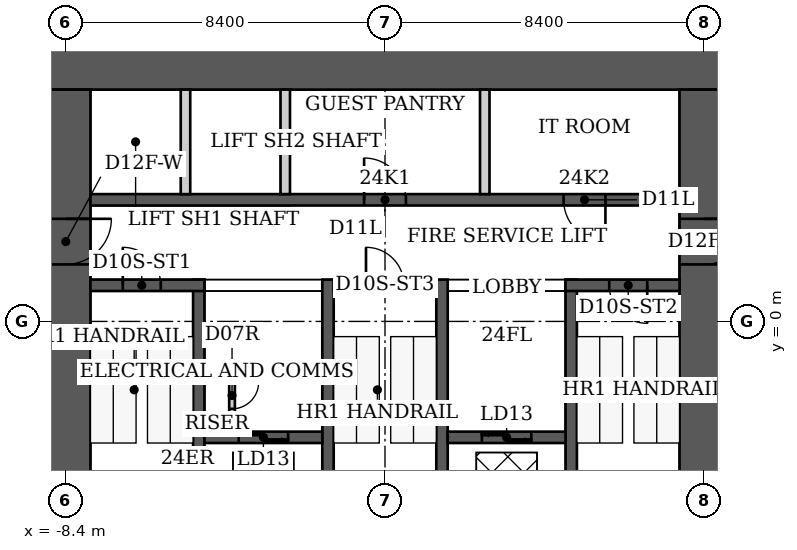
"""IFC4 building model, lengths in metres.
Left out: names, types, materials, properties, quantities, classifications, styles, units other than length and angle.
Written with IfcOpenShell. Run it as: python <this file> out.ifc"""

import sys

from ifc_helpers import new_model, si_unit, direction, frame, frame_2d, origin, place, context, subcontext, project, spatial, rectangle, extrude, element, fill, save


model = new_model("IFC4")
c1 = context("Model", 3, precision=1e-05, world=origin(), true_north=direction((0.0, 1.0)))
c2 = subcontext(c1, "Body", "Model", "MODEL_VIEW")
j1 = project(units=[si_unit("LENGTHUNIT", "METRE"), si_unit("PLANEANGLEUNIT", "RADIAN")], contexts=[c1])
p1 = place(None, origin())
s1 = spatial("IfcSite", under=j1, at=p1, CompositionType="ELEMENT")
p2 = place(p1, origin())
s2 = spatial("IfcBuilding", under=s1, at=p2, CompositionType="ELEMENT")
p3 = place(p2, frame((0.0, 0.0, 100.6)))
s3 = spatial("IfcBuildingStorey", under=s2, at=p3, CompositionType="ELEMENT", Elevation=100.6)
p4 = place(p3, frame((-9.05, 6.75, 0.0), z_axis=(0.0, 0.0, 1.0), x_axis=(1.0, 0.0, 0.0)))
e1 = element("IfcWall", 1, at=p4, inside=s3, PredefinedType="SHEAR", context=c2, shape_type="SweptSolid", body=[
    extrude(rectangle(XDim=18.1, YDim=1.3, at=frame_2d((9.05, 0.0))), origin(), (0.0, 0.0, 1.0), 3.8),
])
p5 = place(p3, frame((-8.4, -9.2, 0.0), z_axis=(0.0, 0.0, 1.0), x_axis=(0.0, 1.0, 0.0)))
e2 = element("IfcWall", 2, at=p5, inside=s3, PredefinedType="SHEAR", context=c2, shape_type="SweptSolid", body=[
    extrude(rectangle(XDim=15.3, YDim=1.3, at=frame_2d((7.65, 0.0))), origin(), (0.0, 0.0, 1.0), 3.8),
])
p6 = place(p5, frame((10.7, 0.0, 0.0)))
e3 = element("IfcOpeningElement", 3, at=p6, cuts=e2, PredefinedType="OPENING", context=c2, shape_type="SweptSolid", body=[
    extrude(rectangle(XDim=1.2, YDim=2.2, at=frame_2d((0.6, 1.1))), frame((0.0, 0.65, 0.0), z_axis=(0.0, -1.0, 0.0), x_axis=(1.0, 0.0, 0.0)), (0.0, 0.0, 1.0), 1.3),
])
p7 = place(p3, frame((8.4, -9.2, 0.0), z_axis=(0.0, 0.0, 1.0), x_axis=(0.0, 1.0, 0.0)))
e4 = element("IfcWall", 4, at=p7, inside=s3, PredefinedType="SHEAR", context=c2, shape_type="SweptSolid", body=[
    extrude(rectangle(XDim=15.3, YDim=1.3, at=frame_2d((7.65, 0.0))), origin(), (0.0, 0.0, 1.0), 3.8),
])
p8 = place(p7, frame((10.7, 0.0, 0.0)))
e5 = element("IfcOpeningElement", 5, at=p8, cuts=e4, PredefinedType="OPENING", context=c2, shape_type="SweptSolid", body=[
    extrude(rectangle(XDim=1.2, YDim=2.2, at=frame_2d((0.6, 1.1))), frame((0.0, 0.65, 0.0), z_axis=(0.0, -1.0, 0.0), x_axis=(1.0, 0.0, 0.0)), (0.0, 0.0, 1.0), 1.3),
])
for number, where, z_axis, x_axis in (
    (6, (-4.9, -6.1, 0.0), (0.0, 0.0, 1.0), (0.0, 1.0, 0.0)),
    (7, (-1.5, -6.1, 0.0), (0.0, 0.0, 1.0), (0.0, 1.0, 0.0)),
    (8, (1.5, -6.1, 0.0), (0.0, 0.0, 1.0), (0.0, 1.0, 0.0)),
    (9, (4.9, -6.1, 0.0), (0.0, 0.0, 1.0), (0.0, 1.0, 0.0)),
):
    element("IfcWall", number, at=place(p3, frame(where, z_axis=z_axis, x_axis=x_axis)), inside=s3, PredefinedType="SHEAR", context=c2, shape_type="SweptSolid", body=[
        extrude(rectangle(XDim=7.2, YDim=0.3, at=frame_2d((3.6, 0.0))), origin(), (0.0, 0.0, 1.0), 3.8),
    ])
p9 = place(p3, frame((-7.75, 0.95, 0.0), z_axis=(0.0, 0.0, 1.0), x_axis=(1.0, 0.0, 0.0)))
e10 = element("IfcWall", 10, at=p9, inside=s3, PredefinedType="SHEAR", context=c2, shape_type="SweptSolid", body=[
    extrude(rectangle(XDim=3.0, YDim=0.3, at=frame_2d((1.5, 0.0))), origin(), (0.0, 0.0, 1.0), 3.8),
])
p10 = place(p9, frame((0.85, 0.0, 0.0)))
e11 = element("IfcOpeningElement", 11, at=p10, cuts=e10, PredefinedType="OPENING", context=c2, shape_type="SweptSolid", body=[
    extrude(rectangle(XDim=1.0, YDim=2.2, at=frame_2d((0.5, 1.1))), frame((0.0, 0.15, 0.0), z_axis=(0.0, -1.0, 0.0), x_axis=(1.0, 0.0, 0.0)), (0.0, 0.0, 1.0), 0.3),
])
p11 = place(p3, frame((-1.35, 0.95, 0.0), z_axis=(0.0, 0.0, 1.0), x_axis=(1.0, 0.0, 0.0)))
e12 = element("IfcWall", 12, at=p11, inside=s3, PredefinedType="SHEAR", context=c2, shape_type="SweptSolid", body=[
    extrude(rectangle(XDim=2.7, YDim=0.3, at=frame_2d((1.35, 0.0))), origin(), (0.0, 0.0, 1.0), 3.8),
])
p12 = place(p11, frame((0.85, 0.0, 0.0)))
e13 = element("IfcOpeningElement", 13, at=p12, cuts=e12, PredefinedType="OPENING", context=c2, shape_type="SweptSolid", body=[
    extrude(rectangle(XDim=1.0, YDim=2.2, at=frame_2d((0.5, 1.1))), frame((0.0, 0.15, 0.0), z_axis=(0.0, -1.0, 0.0), x_axis=(1.0, 0.0, 0.0)), (0.0, 0.0, 1.0), 0.3),
])
p13 = place(p3, frame((4.75, 0.95, 0.0), z_axis=(0.0, 0.0, 1.0), x_axis=(1.0, 0.0, 0.0)))
e14 = element("IfcWall", 14, at=p13, inside=s3, PredefinedType="SHEAR", context=c2, shape_type="SweptSolid", body=[
    extrude(rectangle(XDim=3.0, YDim=0.3, at=frame_2d((1.5, 0.0))), origin(), (0.0, 0.0, 1.0), 3.8),
])
p14 = place(p13, frame((1.15, 0.0, 0.0)))
e15 = element("IfcOpeningElement", 15, at=p14, cuts=e14, PredefinedType="OPENING", context=c2, shape_type="SweptSolid", body=[
    extrude(rectangle(XDim=1.0, YDim=2.2, at=frame_2d((0.5, 1.1))), frame((0.0, 0.15, 0.0), z_axis=(0.0, -1.0, 0.0), x_axis=(1.0, 0.0, 0.0)), (0.0, 0.0, 1.0), 0.3),
])
p15 = place(p3, frame((-4.75, -3.05, 0.0), z_axis=(0.0, 0.0, 1.0), x_axis=(1.0, 0.0, 0.0)))
e16 = element("IfcWall", 16, at=p15, inside=s3, PredefinedType="SHEAR", context=c2, shape_type="SweptSolid", body=[
    extrude(rectangle(XDim=3.1, YDim=0.3, at=frame_2d((1.55, 0.0))), origin(), (0.0, 0.0, 1.0), 3.8),
])
p16 = place(p15, frame((0.9, 0.0, 0.0)))
e17 = element("IfcOpeningElement", 17, at=p16, cuts=e16, PredefinedType="OPENING", context=c2, shape_type="SweptSolid", body=[
    extrude(rectangle(XDim=1.3, YDim=2.1, at=frame_2d((0.65, 1.05))), frame((0.0, 0.15, 0.0), z_axis=(0.0, -1.0, 0.0), x_axis=(1.0, 0.0, 0.0)), (0.0, 0.0, 1.0), 0.3),
])
p17 = place(p3, frame((1.65, -3.05, 0.0), z_axis=(0.0, 0.0, 1.0), x_axis=(1.0, 0.0, 0.0)))
e18 = element("IfcWall", 18, at=p17, inside=s3, PredefinedType="SHEAR", context=c2, shape_type="SweptSolid", body=[
    extrude(rectangle(XDim=3.1, YDim=0.3, at=frame_2d((1.55, 0.0))), origin(), (0.0, 0.0, 1.0), 3.8),
])
p18 = place(p17, frame((0.9, 0.0, 0.0)))
e19 = element("IfcOpeningElement", 19, at=p18, cuts=e18, PredefinedType="OPENING", context=c2, shape_type="SweptSolid", body=[
    extrude(rectangle(XDim=1.3, YDim=2.1, at=frame_2d((0.65, 1.05))), frame((0.0, 0.15, 0.0), z_axis=(0.0, -1.0, 0.0), x_axis=(1.0, 0.0, 0.0)), (0.0, 0.0, 1.0), 0.3),
])
p19 = place(p3, frame((-7.75, 3.2, 0.0), z_axis=(0.0, 0.0, 1.0), x_axis=(1.0, 0.0, 0.0)))
e20 = element("IfcWall", 20, at=p19, inside=s3, PredefinedType="SHEAR", context=c2, shape_type="SweptSolid", body=[
    extrude(rectangle(XDim=15.5, YDim=0.3, at=frame_2d((7.75, 0.0))), origin(), (0.0, 0.0, 1.0), 3.8),
])
p20 = place(p19, frame((7.2, 0.0, 0.0)))
e21 = element("IfcOpeningElement", 21, at=p20, cuts=e20, PredefinedType="OPENING", context=c2, shape_type="SweptSolid", body=[
    extrude(rectangle(XDim=1.1, YDim=2.2, at=frame_2d((0.55, 1.1))), frame((0.0, 0.15, 0.0), z_axis=(0.0, -1.0, 0.0), x_axis=(1.0, 0.0, 0.0)), (0.0, 0.0, 1.0), 0.3),
])
p21 = place(p19, frame((12.45, 0.0, 0.0)))
e22 = element("IfcOpeningElement", 22, at=p21, cuts=e20, PredefinedType="OPENING", context=c2, shape_type="SweptSolid", body=[
    extrude(rectangle(XDim=1.1, YDim=2.2, at=frame_2d((0.55, 1.1))), frame((0.0, 0.15, 0.0), z_axis=(0.0, -1.0, 0.0), x_axis=(1.0, 0.0, 0.0)), (0.0, 0.0, 1.0), 0.3),
])
for number, where, z_axis, x_axis in (
    (23, (-5.25, 3.35, 0.0), (0.0, 0.0, 1.0), (0.0, 1.0, 0.0)),
    (24, (-2.625, 3.35, 0.0), (0.0, 0.0, 1.0), (0.0, 1.0, 0.0)),
    (25, (2.625, 3.35, 0.0), (0.0, 0.0, 1.0), (0.0, 1.0, 0.0)),
):
    element("IfcWall", number, at=place(p3, frame(where, z_axis=z_axis, x_axis=x_axis)), inside=s3, PredefinedType="PARTITIONING", context=c2, shape_type="SweptSolid", body=[
        extrude(rectangle(XDim=2.75, YDim=0.25, at=frame_2d((1.375, 0.0))), origin(), (0.0, 0.0, 1.0), 3.8),
    ])
p22 = place(p3, frame((-4.025, -2.9, 0.0), z_axis=(0.0, 0.0, 1.0), x_axis=(0.0, 1.0, 0.0)))
e26 = element("IfcWall", 26, at=p22, inside=s3, PredefinedType="PARTITIONING", context=c2, shape_type="SweptSolid", body=[
    extrude(rectangle(XDim=1.775, YDim=0.15, at=frame_2d((0.887, 0.0))), origin(), (0.0, 0.0, 1.0), 3.64),
])
p23 = place(p22, frame((0.6, 0.0, 0.0)))
e27 = element("IfcOpeningElement", 27, at=p23, cuts=e26, PredefinedType="OPENING", context=c2, shape_type="SweptSolid", body=[
    extrude(rectangle(XDim=0.7, YDim=2.1, at=frame_2d((0.35, 1.05))), frame((0.0, 0.075, 0.0), z_axis=(0.0, -1.0, 0.0), x_axis=(1.0, 0.0, 0.0)), (0.0, 0.0, 1.0), 0.15),
])
p24 = place(p3, frame((-4.75, -1.2, 0.0), z_axis=(0.0, 0.0, 1.0), x_axis=(1.0, 0.0, 0.0)))
e28 = element("IfcWall", 28, at=p24, inside=s3, PredefinedType="PARTITIONING", context=c2, shape_type="SweptSolid", body=[
    extrude(rectangle(XDim=0.8, YDim=0.15, at=frame_2d((0.4, 0.0))), origin(), (0.0, 0.0, 1.0), 3.64),
])
p25 = place(p10, origin())
e29 = element("IfcDoor", 29, at=p25, inside=s3, OperationType="SINGLE_SWING_LEFT", PredefinedType="DOOR", context=c2, shape_type="SweptSolid", body=[
    extrude(rectangle(XDim=1.0, YDim=2.2, at=frame_2d((0.5, 1.1))), frame((0.0, 0.025, 0.0), z_axis=(0.0, -1.0, 0.0), x_axis=(1.0, 0.0, 0.0)), (0.0, 0.0, 1.0), 0.05),
])
fill(e11, e29)
p26 = place(p12, origin())
e30 = element("IfcDoor", 30, at=p26, inside=s3, OperationType="SINGLE_SWING_LEFT", PredefinedType="DOOR", context=c2, shape_type="SweptSolid", body=[
    extrude(rectangle(XDim=1.0, YDim=2.2, at=frame_2d((0.5, 1.1))), frame((0.0, 0.025, 0.0), z_axis=(0.0, -1.0, 0.0), x_axis=(1.0, 0.0, 0.0)), (0.0, 0.0, 1.0), 0.05),
])
fill(e13, e30)
p27 = place(p14, origin())
e31 = element("IfcDoor", 31, at=p27, inside=s3, OperationType="SINGLE_SWING_RIGHT", PredefinedType="DOOR", context=c2, shape_type="SweptSolid", body=[
    extrude(rectangle(XDim=1.0, YDim=2.2, at=frame_2d((0.5, 1.1))), frame((0.0, 0.025, 0.0), z_axis=(0.0, -1.0, 0.0), x_axis=(1.0, 0.0, 0.0)), (0.0, 0.0, 1.0), 0.05),
])
fill(e15, e31)
p28 = place(p6, origin())
e32 = element("IfcDoor", 32, at=p28, inside=s3, OperationType="SINGLE_SWING_RIGHT", PredefinedType="DOOR", context=c2, shape_type="SweptSolid", body=[
    extrude(rectangle(XDim=1.2, YDim=2.2, at=frame_2d((0.6, 1.1))), frame((0.0, 0.025, 0.0), z_axis=(0.0, -1.0, 0.0), x_axis=(1.0, 0.0, 0.0)), (0.0, 0.0, 1.0), 0.05),
])
fill(e3, e32)
p29 = place(p8, origin())
e33 = element("IfcDoor", 33, at=p29, inside=s3, OperationType="SINGLE_SWING_RIGHT", PredefinedType="DOOR", context=c2, shape_type="SweptSolid", body=[
    extrude(rectangle(XDim=1.2, YDim=2.2, at=frame_2d((0.6, 1.1))), frame((0.0, 0.025, 0.0), z_axis=(0.0, -1.0, 0.0), x_axis=(1.0, 0.0, 0.0)), (0.0, 0.0, 1.0), 0.05),
])
fill(e5, e33)
p30 = place(p23, origin())
e34 = element("IfcDoor", 34, at=p30, inside=s3, OperationType="SINGLE_SWING_RIGHT", PredefinedType="DOOR", context=c2, shape_type="SweptSolid", body=[
    extrude(rectangle(XDim=0.7, YDim=2.1, at=frame_2d((0.35, 1.05))), frame((0.0, 0.025, 0.0), z_axis=(0.0, -1.0, 0.0), x_axis=(1.0, 0.0, 0.0)), (0.0, 0.0, 1.0), 0.05),
])
fill(e27, e34)
p31 = place(p20, origin())
e35 = element("IfcDoor", 35, at=p31, inside=s3, OperationType="SINGLE_SWING_LEFT", PredefinedType="DOOR", context=c2, shape_type="SweptSolid", body=[
    extrude(rectangle(XDim=1.1, YDim=2.2, at=frame_2d((0.55, 1.1))), frame((0.0, 0.025, 0.0), z_axis=(0.0, -1.0, 0.0), x_axis=(1.0, 0.0, 0.0)), (0.0, 0.0, 1.0), 0.05),
])
fill(e21, e35)
p32 = place(p21, origin())
e36 = element("IfcDoor", 36, at=p32, inside=s3, OperationType="SINGLE_SWING_RIGHT", PredefinedType="DOOR", context=c2, shape_type="SweptSolid", body=[
    extrude(rectangle(XDim=1.1, YDim=2.2, at=frame_2d((0.55, 1.1))), frame((0.0, 0.025, 0.0), z_axis=(0.0, -1.0, 0.0), x_axis=(1.0, 0.0, 0.0)), (0.0, 0.0, 1.0), 0.05),
])
fill(e22, e36)
p33 = place(p16, origin())
e37 = element("IfcDoor", 37, at=p33, inside=s3, OperationType="DOUBLE_DOOR_SLIDING", PredefinedType="DOOR", context=c2, shape_type="SweptSolid", body=[
    extrude(rectangle(XDim=1.3, YDim=2.1, at=frame_2d((0.65, 1.05))), frame((0.0, 0.025, 0.0), z_axis=(0.0, -1.0, 0.0), x_axis=(1.0, 0.0, 0.0)), (0.0, 0.0, 1.0), 0.05),
])
fill(e17, e37)
p34 = place(p18, origin())
e38 = element("IfcDoor", 38, at=p34, inside=s3, OperationType="DOUBLE_DOOR_SLIDING", PredefinedType="DOOR", context=c2, shape_type="SweptSolid", body=[
    extrude(rectangle(XDim=1.3, YDim=2.1, at=frame_2d((0.65, 1.05))), frame((0.0, 0.025, 0.0), z_axis=(0.0, -1.0, 0.0), x_axis=(1.0, 0.0, 0.0)), (0.0, 0.0, 1.0), 0.05),
])
fill(e19, e38)
save(model, sys.argv[1])
